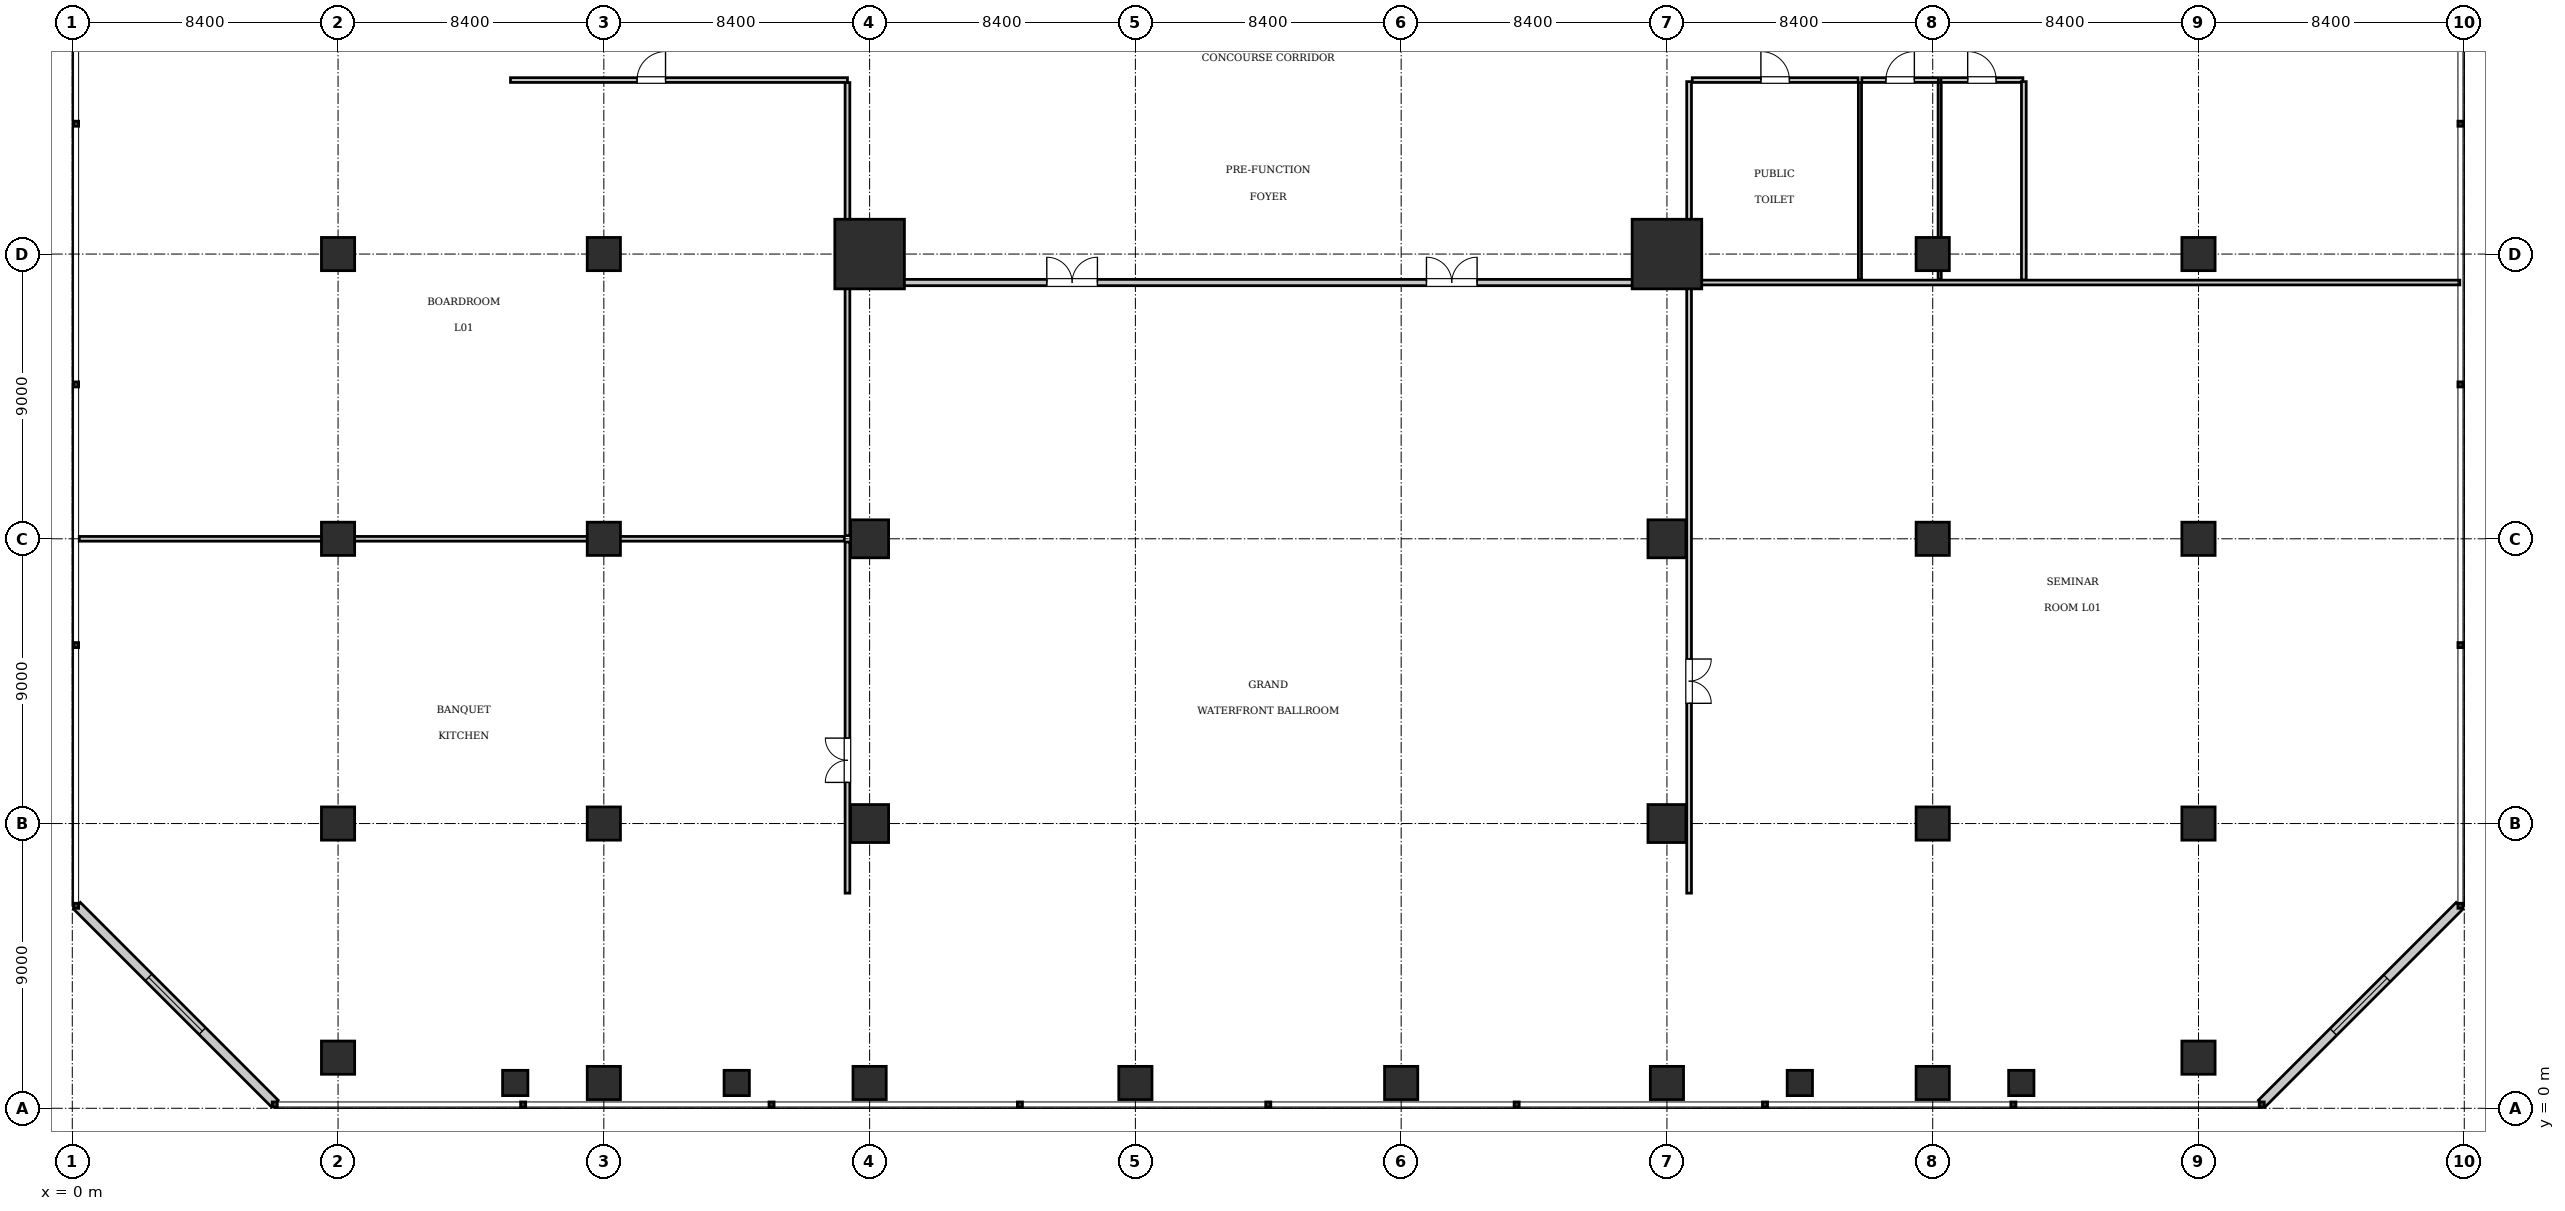
"""IFC4 building model, lengths in metres.
Left out: names, types, materials, properties, quantities, classifications, styles, units other than length and angle.
Written with IfcOpenShell. Run it as: python <this file> out.ifc"""

import sys

from ifc_helpers import new_model, si_unit, direction, frame, frame_2d, origin, origin_2d, place, context, subcontext, project, spatial, rectangle, extrude, element, fill, save


model = new_model("IFC4")
c1 = context("Model", 3, precision=1e-05, world=origin(), true_north=direction((0.0, 1.0)))
c2 = subcontext(c1, "Body", "Model", "MODEL_VIEW")
j1 = project(units=[si_unit("LENGTHUNIT", "METRE"), si_unit("PLANEANGLEUNIT", "RADIAN")], contexts=[c1])
p1 = place(None, origin())
s1 = spatial("IfcSite", under=j1, at=p1, CompositionType="ELEMENT")
p2 = place(p1, origin())
s2 = spatial("IfcBuilding", under=s1, at=p2, CompositionType="ELEMENT")
p3 = place(p2, frame((0.0, 0.0, 5.6)))
s3 = spatial("IfcBuildingStorey", under=s2, at=p3, CompositionType="ELEMENT", Elevation=5.6)
for number, where, z_axis, x_axis in (
    (1, (25.2, 27.0, 0.0), (0.0, 0.0, 1.0), (1.0, 0.0, 0.0)),
    (2, (50.4, 27.0, 0.0), (0.0, 0.0, 1.0), (1.0, 0.0, 0.0)),
):
    element("IfcColumn", number, at=place(p3, frame(where, z_axis=z_axis, x_axis=x_axis)), inside=s3, PredefinedType="COLUMN", context=c2, shape_type="SweptSolid", body=[
        extrude(rectangle(XDim=2.2, YDim=2.2, at=origin_2d()), origin(), (0.0, 0.0, 1.0), 5.25),
    ])
for number, where, z_axis, x_axis in (
    (3, (25.2, 18.0, 0.0), (0.0, 0.0, 1.0), (1.0, 0.0, 0.0)),
    (4, (50.4, 18.0, 0.0), (0.0, 0.0, 1.0), (1.0, 0.0, 0.0)),
    (5, (25.2, 9.0, 0.0), (0.0, 0.0, 1.0), (1.0, 0.0, 0.0)),
    (6, (50.4, 9.0, 0.0), (0.0, 0.0, 1.0), (1.0, 0.0, 0.0)),
):
    element("IfcColumn", number, at=place(p3, frame(where, z_axis=z_axis, x_axis=x_axis)), inside=s3, PredefinedType="COLUMN", context=c2, shape_type="SweptSolid", body=[
        extrude(rectangle(XDim=1.2, YDim=1.2, at=origin_2d()), origin(), (0.0, 0.0, 1.0), 5.25),
    ])
for number, where, z_axis, x_axis in (
    (7, (16.8, 9.0, 0.0), (0.0, 0.0, 1.0), (1.0, 0.0, 0.0)),
    (8, (58.8, 9.0, 0.0), (0.0, 0.0, 1.0), (1.0, 0.0, 0.0)),
    (9, (16.8, 18.0, 0.0), (0.0, 0.0, 1.0), (1.0, 0.0, 0.0)),
    (10, (58.8, 18.0, 0.0), (0.0, 0.0, 1.0), (1.0, 0.0, 0.0)),
    (11, (16.8, 27.0, 0.0), (0.0, 0.0, 1.0), (1.0, 0.0, 0.0)),
    (12, (58.8, 27.0, 0.0), (0.0, 0.0, 1.0), (1.0, 0.0, 0.0)),
    (13, (8.4, 1.6, 0.0), (0.0, 0.0, 1.0), (1.0, 0.0, 0.0)),
    (14, (67.2, 1.6, 0.0), (0.0, 0.0, 1.0), (1.0, 0.0, 0.0)),
    (15, (8.4, 9.0, 0.0), (0.0, 0.0, 1.0), (1.0, 0.0, 0.0)),
    (16, (67.2, 9.0, 0.0), (0.0, 0.0, 1.0), (1.0, 0.0, 0.0)),
    (17, (8.4, 18.0, 0.0), (0.0, 0.0, 1.0), (1.0, 0.0, 0.0)),
    (18, (67.2, 18.0, 0.0), (0.0, 0.0, 1.0), (1.0, 0.0, 0.0)),
    (19, (8.4, 27.0, 0.0), (0.0, 0.0, 1.0), (1.0, 0.0, 0.0)),
    (20, (67.2, 27.0, 0.0), (0.0, 0.0, 1.0), (1.0, 0.0, 0.0)),
    (21, (16.8, 0.8, 0.0), (0.0, 0.0, 1.0), (1.0, 0.0, 0.0)),
    (22, (25.2, 0.8, 0.0), (0.0, 0.0, 1.0), (1.0, 0.0, 0.0)),
    (23, (33.6, 0.8, 0.0), (0.0, 0.0, 1.0), (1.0, 0.0, 0.0)),
    (24, (42.0, 0.8, 0.0), (0.0, 0.0, 1.0), (1.0, 0.0, 0.0)),
    (25, (50.4, 0.8, 0.0), (0.0, 0.0, 1.0), (1.0, 0.0, 0.0)),
    (26, (58.8, 0.8, 0.0), (0.0, 0.0, 1.0), (1.0, 0.0, 0.0)),
):
    element("IfcColumn", number, at=place(p3, frame(where, z_axis=z_axis, x_axis=x_axis)), inside=s3, PredefinedType="COLUMN", context=c2, shape_type="SweptSolid", body=[
        extrude(rectangle(XDim=1.05, YDim=1.05, at=origin_2d()), origin(), (0.0, 0.0, 1.0), 5.25),
    ])
for number, where, z_axis, x_axis in (
    (27, (14.0, 0.8, 0.0), (0.0, 0.0, 1.0), (1.0, 0.0, 0.0)),
    (28, (21.0, 0.8, 0.0), (0.0, 0.0, 1.0), (1.0, 0.0, 0.0)),
    (29, (54.6, 0.8, 0.0), (0.0, 0.0, 1.0), (1.0, 0.0, 0.0)),
    (30, (61.6, 0.8, 0.0), (0.0, 0.0, 1.0), (1.0, 0.0, 0.0)),
):
    element("IfcColumn", number, at=place(p3, frame(where, z_axis=z_axis, x_axis=x_axis)), inside=s3, PredefinedType="PILASTER", context=c2, shape_type="SweptSolid", body=[
        extrude(rectangle(XDim=0.8, YDim=0.8, at=origin_2d()), origin(), (0.0, 0.0, 1.0), 5.25),
    ])
p4 = place(p3, frame((0.15, 6.4, 0.0), z_axis=(0.0, 0.0, 1.0), x_axis=(0.707106781187, -0.707106781187, 0.0)))
e31 = element("IfcWall", 31, at=p4, inside=s3, PredefinedType="SOLIDWALL", context=c2, shape_type="SweptSolid", body=[
    extrude(rectangle(XDim=8.839, YDim=0.3, at=frame_2d((4.419, 0.0))), origin(), (0.0, 0.0, 1.0), 4.97),
])
p5 = place(p4, frame((3.2, 0.0, 0.9)))
e32 = element("IfcOpeningElement", 32, at=p5, cuts=e31, PredefinedType="OPENING", context=c2, shape_type="SweptSolid", body=[
    extrude(rectangle(XDim=2.4, YDim=2.6, at=frame_2d((1.2, 1.3))), frame((0.0, 0.16, 0.0), z_axis=(0.0, -1.0, 0.0), x_axis=(1.0, 0.0, 0.0)), (0.0, 0.0, 1.0), 0.32),
])
p6 = place(p3, frame((69.2, 0.15, 0.0), z_axis=(0.0, 0.0, 1.0), x_axis=(0.707106781187, 0.707106781187, 0.0)))
e33 = element("IfcWall", 33, at=p6, inside=s3, PredefinedType="SOLIDWALL", context=c2, shape_type="SweptSolid", body=[
    extrude(rectangle(XDim=8.839, YDim=0.3, at=frame_2d((4.419, 0.0))), origin(), (0.0, 0.0, 1.0), 4.97),
])
p7 = place(p6, frame((3.2, 0.0, 0.9)))
e34 = element("IfcOpeningElement", 34, at=p7, cuts=e33, PredefinedType="OPENING", context=c2, shape_type="SweptSolid", body=[
    extrude(rectangle(XDim=2.4, YDim=2.6, at=frame_2d((1.2, 1.3))), frame((0.0, 0.16, 0.0), z_axis=(0.0, -1.0, 0.0), x_axis=(1.0, 0.0, 0.0)), (0.0, 0.0, 1.0), 0.32),
])
p8 = place(p3, frame((25.8, 26.1, 0.0), z_axis=(0.0, 0.0, 1.0), x_axis=(1.0, 0.0, 0.0)))
e35 = element("IfcWall", 35, at=p8, inside=s3, PredefinedType="PARTITIONING", context=c2, shape_type="SweptSolid", body=[
    extrude(rectangle(XDim=24.0, YDim=0.2, at=frame_2d((12.0, 0.0))), origin(), (0.0, 0.0, 1.0), 4.97),
])
p9 = place(p8, frame((5.0, 0.0, 0.0)))
e36 = element("IfcOpeningElement", 36, at=p9, cuts=e35, PredefinedType="OPENING", context=c2, shape_type="SweptSolid", body=[
    extrude(rectangle(XDim=1.6, YDim=2.3, at=frame_2d((0.8, 1.15))), frame((0.0, 0.11, 0.0), z_axis=(0.0, -1.0, 0.0), x_axis=(1.0, 0.0, 0.0)), (0.0, 0.0, 1.0), 0.22),
])
p10 = place(p8, frame((17.0, 0.0, 0.0)))
e37 = element("IfcOpeningElement", 37, at=p10, cuts=e35, PredefinedType="OPENING", context=c2, shape_type="SweptSolid", body=[
    extrude(rectangle(XDim=1.6, YDim=2.3, at=frame_2d((0.8, 1.15))), frame((0.0, 0.11, 0.0), z_axis=(0.0, -1.0, 0.0), x_axis=(1.0, 0.0, 0.0)), (0.0, 0.0, 1.0), 0.22),
])
p11 = place(p3, frame((0.22, 18.0, 0.0), z_axis=(0.0, 0.0, 1.0), x_axis=(1.0, 0.0, 0.0)))
e38 = element("IfcWall", 38, at=p11, inside=s3, PredefinedType="PARTITIONING", context=c2, shape_type="SweptSolid", body=[
    extrude(rectangle(XDim=24.18, YDim=0.15, at=frame_2d((12.09, 0.0))), origin(), (0.0, 0.0, 1.0), 4.335),
])
p12 = place(p3, frame((13.85, 32.5, 0.0), z_axis=(0.0, 0.0, 1.0), x_axis=(1.0, 0.0, 0.0)))
e39 = element("IfcWall", 39, at=p12, inside=s3, PredefinedType="PARTITIONING", context=c2, shape_type="SweptSolid", body=[
    extrude(rectangle(XDim=10.65, YDim=0.15, at=frame_2d((5.325, 0.0))), origin(), (0.0, 0.0, 1.0), 4.97),
])
p13 = place(p12, frame((4.0, 0.0, 0.0)))
e40 = element("IfcOpeningElement", 40, at=p13, cuts=e39, PredefinedType="OPENING", context=c2, shape_type="SweptSolid", body=[
    extrude(rectangle(XDim=0.9, YDim=2.1, at=frame_2d((0.45, 1.05))), frame((0.0, 0.085, 0.0), z_axis=(0.0, -1.0, 0.0), x_axis=(1.0, 0.0, 0.0)), (0.0, 0.0, 1.0), 0.17),
])
p14 = place(p3, frame((24.5, 6.8, 0.0), z_axis=(0.0, 0.0, 1.0), x_axis=(0.0, 1.0, 0.0)))
e41 = element("IfcWall", 41, at=p14, inside=s3, PredefinedType="PARTITIONING", context=c2, shape_type="SweptSolid", body=[
    extrude(rectangle(XDim=11.1, YDim=0.15, at=frame_2d((5.55, 0.0))), origin(), (0.0, 0.0, 1.0), 4.97),
])
p15 = place(p14, frame((3.5, 0.0, 0.0)))
e42 = element("IfcOpeningElement", 42, at=p15, cuts=e41, PredefinedType="OPENING", context=c2, shape_type="SweptSolid", body=[
    extrude(rectangle(XDim=1.4, YDim=2.2, at=frame_2d((0.7, 1.1))), frame((0.0, 0.085, 0.0), z_axis=(0.0, -1.0, 0.0), x_axis=(1.0, 0.0, 0.0)), (0.0, 0.0, 1.0), 0.17),
])
p16 = place(p3, frame((24.5, 18.1, 0.0), z_axis=(0.0, 0.0, 1.0), x_axis=(0.0, 1.0, 0.0)))
e43 = element("IfcWall", 43, at=p16, inside=s3, PredefinedType="PARTITIONING", context=c2, shape_type="SweptSolid", body=[
    extrude(rectangle(XDim=14.32, YDim=0.15, at=frame_2d((7.16, 0.0))), origin(), (0.0, 0.0, 1.0), 4.97),
])
p17 = place(p3, frame((51.2, 32.5, 0.0), z_axis=(0.0, 0.0, 1.0), x_axis=(1.0, 0.0, 0.0)))
e44 = element("IfcWall", 44, at=p17, inside=s3, PredefinedType="PARTITIONING", context=c2, shape_type="SweptSolid", body=[
    extrude(rectangle(XDim=5.24, YDim=0.15, at=frame_2d((2.62, 0.0))), origin(), (0.0, 0.0, 1.0), 4.97),
])
p18 = place(p17, frame((2.17, 0.0, 0.0)))
e45 = element("IfcOpeningElement", 45, at=p18, cuts=e44, PredefinedType="OPENING", context=c2, shape_type="SweptSolid", body=[
    extrude(rectangle(XDim=0.9, YDim=2.1, at=frame_2d((0.45, 1.05))), frame((0.0, 0.085, 0.0), z_axis=(0.0, -1.0, 0.0), x_axis=(1.0, 0.0, 0.0)), (0.0, 0.0, 1.0), 0.17),
])
p19 = place(p3, frame((56.56, 32.5, 0.0), z_axis=(0.0, 0.0, 1.0), x_axis=(1.0, 0.0, 0.0)))
e46 = element("IfcWall", 46, at=p19, inside=s3, PredefinedType="PARTITIONING", context=c2, shape_type="SweptSolid", body=[
    extrude(rectangle(XDim=2.42, YDim=0.15, at=frame_2d((1.21, 0.0))), origin(), (0.0, 0.0, 1.0), 4.97),
])
p20 = place(p19, frame((0.76, 0.0, 0.0)))
e47 = element("IfcOpeningElement", 47, at=p20, cuts=e46, PredefinedType="OPENING", context=c2, shape_type="SweptSolid", body=[
    extrude(rectangle(XDim=0.9, YDim=2.1, at=frame_2d((0.45, 1.05))), frame((0.0, 0.085, 0.0), z_axis=(0.0, -1.0, 0.0), x_axis=(1.0, 0.0, 0.0)), (0.0, 0.0, 1.0), 0.17),
])
p21 = place(p3, frame((59.06, 32.5, 0.0), z_axis=(0.0, 0.0, 1.0), x_axis=(1.0, 0.0, 0.0)))
e48 = element("IfcWall", 48, at=p21, inside=s3, PredefinedType="PARTITIONING", context=c2, shape_type="SweptSolid", body=[
    extrude(rectangle(XDim=2.59, YDim=0.15, at=frame_2d((1.295, 0.0))), origin(), (0.0, 0.0, 1.0), 4.97),
])
p22 = place(p21, frame((0.845, 0.0, 0.0)))
e49 = element("IfcOpeningElement", 49, at=p22, cuts=e48, PredefinedType="OPENING", context=c2, shape_type="SweptSolid", body=[
    extrude(rectangle(XDim=0.9, YDim=2.1, at=frame_2d((0.45, 1.05))), frame((0.0, 0.085, 0.0), z_axis=(0.0, -1.0, 0.0), x_axis=(1.0, 0.0, 0.0)), (0.0, 0.0, 1.0), 0.17),
])
for number, where, z_axis, x_axis in (
    (50, (51.1, 26.18, 0.0), (0.0, 0.0, 1.0), (0.0, 1.0, 0.0)),
    (51, (61.68, 26.18, 0.0), (0.0, 0.0, 1.0), (0.0, 1.0, 0.0)),
):
    element("IfcWall", number, at=place(p3, frame(where, z_axis=z_axis, x_axis=x_axis)), inside=s3, PredefinedType="PARTITIONING", context=c2, shape_type="SweptSolid", body=[
        extrude(rectangle(XDim=6.27, YDim=0.15, at=frame_2d((3.135, 0.0))), origin(), (0.0, 0.0, 1.0), 4.97),
    ])
for number, where, z_axis, x_axis in (
    (52, (56.5, 26.18, 0.0), (0.0, 0.0, 1.0), (0.0, 1.0, 0.0)),
    (53, (59.02, 26.18, 0.0), (0.0, 0.0, 1.0), (0.0, 1.0, 0.0)),
):
    element("IfcWall", number, at=place(p3, frame(where, z_axis=z_axis, x_axis=x_axis)), inside=s3, PredefinedType="PARTITIONING", context=c2, shape_type="SweptSolid", body=[
        extrude(rectangle(XDim=6.24, YDim=0.1, at=frame_2d((3.12, 0.0))), origin(), (0.0, 0.0, 1.0), 4.97),
    ])
p23 = place(p3, frame((51.1, 6.8, 0.0), z_axis=(0.0, 0.0, 1.0), x_axis=(0.0, 1.0, 0.0)))
e54 = element("IfcWall", 54, at=p23, inside=s3, PredefinedType="PARTITIONING", context=c2, shape_type="SweptSolid", body=[
    extrude(rectangle(XDim=19.2, YDim=0.15, at=frame_2d((9.6, 0.0))), origin(), (0.0, 0.0, 1.0), 4.97),
])
p24 = place(p23, frame((6.0, 0.0, 0.0)))
e55 = element("IfcOpeningElement", 55, at=p24, cuts=e54, PredefinedType="OPENING", context=c2, shape_type="SweptSolid", body=[
    extrude(rectangle(XDim=1.4, YDim=2.2, at=frame_2d((0.7, 1.1))), frame((0.0, 0.085, 0.0), z_axis=(0.0, -1.0, 0.0), x_axis=(1.0, 0.0, 0.0)), (0.0, 0.0, 1.0), 0.17),
])
p25 = place(p3, frame((51.12, 26.1, 0.0), z_axis=(0.0, 0.0, 1.0), x_axis=(1.0, 0.0, 0.0)))
e56 = element("IfcWall", 56, at=p25, inside=s3, PredefinedType="PARTITIONING", context=c2, shape_type="SweptSolid", body=[
    extrude(rectangle(XDim=24.34, YDim=0.15, at=frame_2d((12.17, 0.0))), origin(), (0.0, 0.0, 1.0), 4.97),
])
p26 = place(p5, origin())
e57 = element("IfcWindow", 57, at=p26, inside=s3, PartitioningType="SINGLE_PANEL", PredefinedType="WINDOW", context=c2, shape_type="SweptSolid", body=[
    extrude(rectangle(XDim=2.4, YDim=2.6, at=frame_2d((1.2, 1.3))), frame((0.0, 0.03, 0.0), z_axis=(0.0, -1.0, 0.0), x_axis=(1.0, 0.0, 0.0)), (0.0, 0.0, 1.0), 0.06),
])
fill(e32, e57)
p27 = place(p7, origin())
e58 = element("IfcWindow", 58, at=p27, inside=s3, PartitioningType="SINGLE_PANEL", PredefinedType="WINDOW", context=c2, shape_type="SweptSolid", body=[
    extrude(rectangle(XDim=2.4, YDim=2.6, at=frame_2d((1.2, 1.3))), frame((0.0, 0.03, 0.0), z_axis=(0.0, -1.0, 0.0), x_axis=(1.0, 0.0, 0.0)), (0.0, 0.0, 1.0), 0.06),
])
fill(e34, e58)
p28 = place(p9, origin())
e59 = element("IfcDoor", 59, at=p28, inside=s3, OperationType="DOUBLE_DOOR_SINGLE_SWING", PredefinedType="DOOR", context=c2, shape_type="SweptSolid", body=[
    extrude(rectangle(XDim=1.6, YDim=2.3, at=frame_2d((0.8, 1.15))), frame((0.0, 0.025, 0.0), z_axis=(0.0, -1.0, 0.0), x_axis=(1.0, 0.0, 0.0)), (0.0, 0.0, 1.0), 0.05),
])
fill(e36, e59)
p29 = place(p10, origin())
e60 = element("IfcDoor", 60, at=p29, inside=s3, OperationType="DOUBLE_DOOR_SINGLE_SWING", PredefinedType="DOOR", context=c2, shape_type="SweptSolid", body=[
    extrude(rectangle(XDim=1.6, YDim=2.3, at=frame_2d((0.8, 1.15))), frame((0.0, 0.025, 0.0), z_axis=(0.0, -1.0, 0.0), x_axis=(1.0, 0.0, 0.0)), (0.0, 0.0, 1.0), 0.05),
])
fill(e37, e60)
p30 = place(p13, origin())
e61 = element("IfcDoor", 61, at=p30, inside=s3, OperationType="SINGLE_SWING_RIGHT", PredefinedType="DOOR", context=c2, shape_type="SweptSolid", body=[
    extrude(rectangle(XDim=0.9, YDim=2.1, at=frame_2d((0.45, 1.05))), frame((0.0, 0.025, 0.0), z_axis=(0.0, -1.0, 0.0), x_axis=(1.0, 0.0, 0.0)), (0.0, 0.0, 1.0), 0.05),
])
fill(e40, e61)
p31 = place(p15, origin())
e62 = element("IfcDoor", 62, at=p31, inside=s3, OperationType="DOUBLE_DOOR_SINGLE_SWING", PredefinedType="DOOR", context=c2, shape_type="SweptSolid", body=[
    extrude(rectangle(XDim=1.4, YDim=2.2, at=frame_2d((0.7, 1.1))), frame((0.0, 0.025, 0.0), z_axis=(0.0, -1.0, 0.0), x_axis=(1.0, 0.0, 0.0)), (0.0, 0.0, 1.0), 0.05),
])
fill(e42, e62)
p32 = place(p18, origin())
e63 = element("IfcDoor", 63, at=p32, inside=s3, OperationType="SINGLE_SWING_LEFT", PredefinedType="DOOR", context=c2, shape_type="SweptSolid", body=[
    extrude(rectangle(XDim=0.9, YDim=2.1, at=frame_2d((0.45, 1.05))), frame((0.0, 0.025, 0.0), z_axis=(0.0, -1.0, 0.0), x_axis=(1.0, 0.0, 0.0)), (0.0, 0.0, 1.0), 0.05),
])
fill(e45, e63)
p33 = place(p20, origin())
e64 = element("IfcDoor", 64, at=p33, inside=s3, OperationType="SINGLE_SWING_RIGHT", PredefinedType="DOOR", context=c2, shape_type="SweptSolid", body=[
    extrude(rectangle(XDim=0.9, YDim=2.1, at=frame_2d((0.45, 1.05))), frame((0.0, 0.025, 0.0), z_axis=(0.0, -1.0, 0.0), x_axis=(1.0, 0.0, 0.0)), (0.0, 0.0, 1.0), 0.05),
])
fill(e47, e64)
p34 = place(p22, origin())
e65 = element("IfcDoor", 65, at=p34, inside=s3, OperationType="SINGLE_SWING_LEFT", PredefinedType="DOOR", context=c2, shape_type="SweptSolid", body=[
    extrude(rectangle(XDim=0.9, YDim=2.1, at=frame_2d((0.45, 1.05))), frame((0.0, 0.025, 0.0), z_axis=(0.0, -1.0, 0.0), x_axis=(1.0, 0.0, 0.0)), (0.0, 0.0, 1.0), 0.05),
])
fill(e49, e65)
p35 = place(p24, frame((1.4, 0.0, 0.0), z_axis=(0.0, 0.0, 1.0), x_axis=(-1.0, 0.0, 0.0)))
e66 = element("IfcDoor", 66, at=p35, inside=s3, OperationType="DOUBLE_DOOR_SINGLE_SWING", PredefinedType="DOOR", context=c2, shape_type="SweptSolid", body=[
    extrude(rectangle(XDim=1.4, YDim=2.2, at=frame_2d((0.7, 1.1))), frame((0.0, 0.025, 0.0), z_axis=(0.0, -1.0, 0.0), x_axis=(1.0, 0.0, 0.0)), (0.0, 0.0, 1.0), 0.05),
])
fill(e55, e66)
save(model, sys.argv[1])
